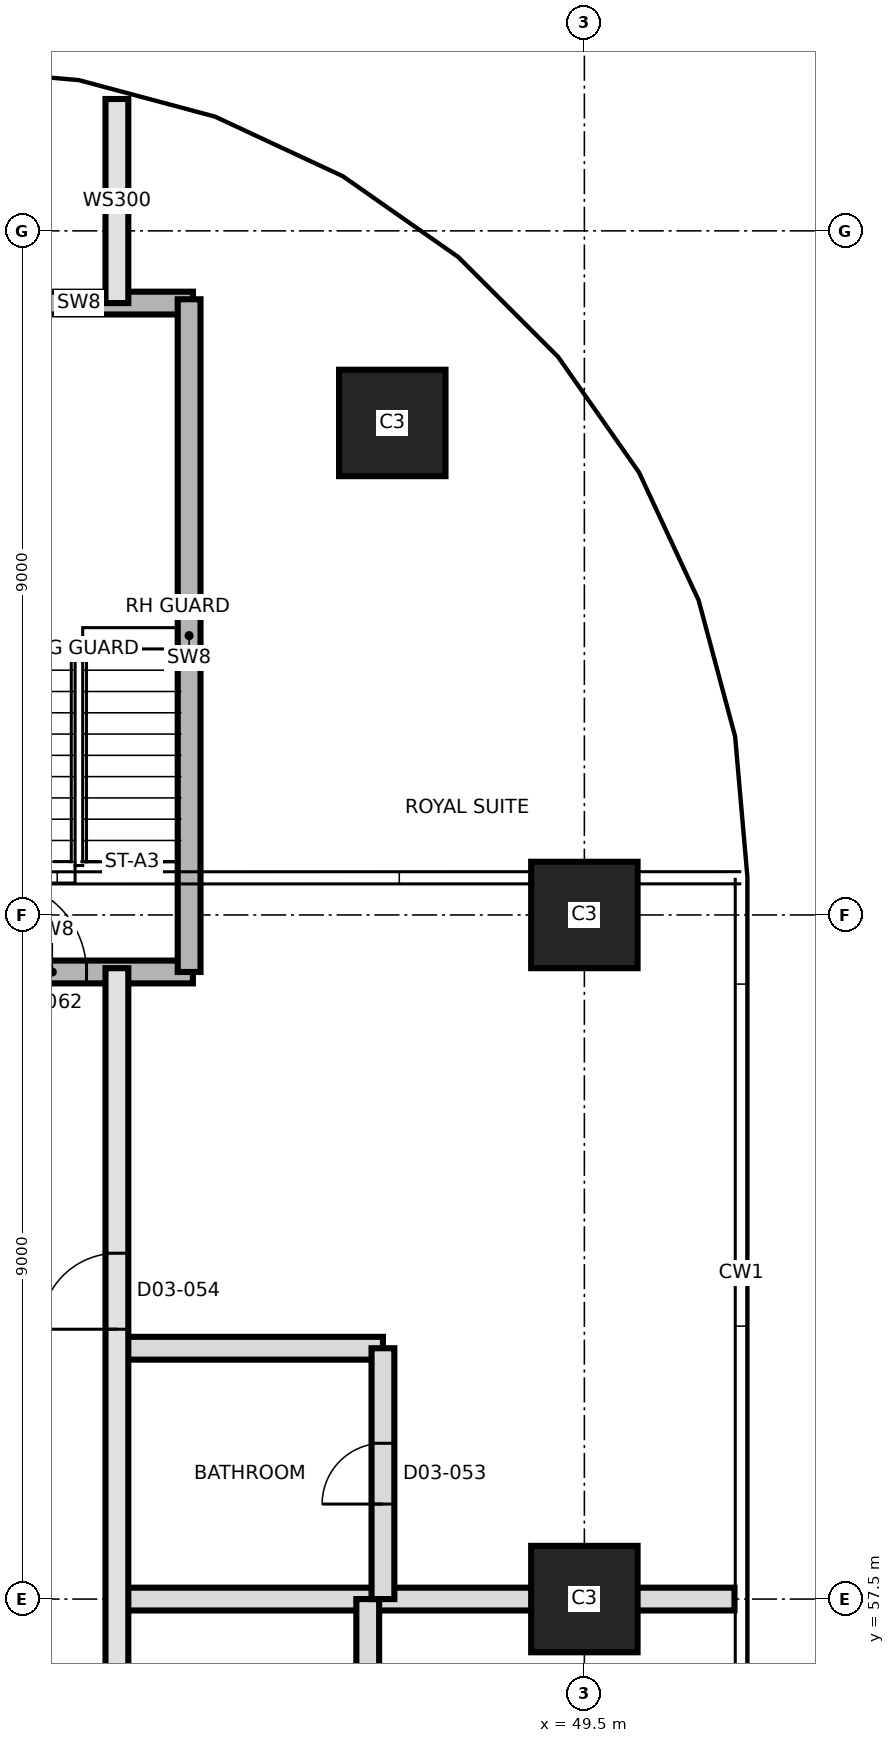
"""IFC4 building model, lengths in metres.
Left out: names, types, materials, properties, quantities, classifications, styles, units other than length and angle.
Written with IfcOpenShell. Run it as: python <this file> out.ifc"""

import sys

from ifc_helpers import new_model, si_unit, direction, frame, frame_2d, origin, origin_2d, place, context, subcontext, project, spatial, rectangle, extrude, element, fill, save


model = new_model("IFC4")
c1 = context("Model", 3, precision=1e-05, world=origin(), true_north=direction((0.0, 1.0)))
c2 = subcontext(c1, "Body", "Model", "MODEL_VIEW")
j1 = project(units=[si_unit("LENGTHUNIT", "METRE"), si_unit("PLANEANGLEUNIT", "RADIAN")], contexts=[c1])
p1 = place(None, origin())
s1 = spatial("IfcSite", under=j1, at=p1, CompositionType="ELEMENT")
p2 = place(p1, origin())
s2 = spatial("IfcBuilding", under=s1, at=p2, CompositionType="ELEMENT")
p3 = place(p2, frame((0.0, 0.0, 55.7)))
s3 = spatial("IfcBuildingStorey", under=s2, at=p3, CompositionType="ELEMENT", Elevation=55.7)
for number, where, z_axis, x_axis in (
    (1, (49.5, 57.5, 0.0), (0.0, 0.0, 1.0), (1.0, 0.0, 0.0)),
    (2, (49.5, 66.5, 0.0), (0.0, 0.0, 1.0), (1.0, 0.0, 0.0)),
    (3, (46.973, 72.973, 0.0), (0.0, 0.0, 1.0), (1.0, 0.0, 0.0)),
):
    element("IfcColumn", number, at=place(p3, frame(where, z_axis=z_axis, x_axis=x_axis)), inside=s3, PredefinedType="COLUMN", context=c2, shape_type="SweptSolid", body=[
        extrude(rectangle(XDim=1.4, YDim=1.4, at=origin_2d()), origin(), (0.0, 0.0, 1.0), 3.7),
    ])
p4 = place(p3, frame((43.35, 57.5, 0.0), z_axis=(0.0, 0.0, 1.0), x_axis=(1.0, 0.0, 0.0)))
e4 = element("IfcWall", 4, at=p4, inside=s3, PredefinedType="PARTITIONING", context=c2, shape_type="SweptSolid", body=[
    extrude(rectangle(XDim=8.125, YDim=0.3, at=frame_2d((4.062, 0.0))), origin(), (0.0, 0.0, 1.0), 3.4),
])
p5 = place(p3, frame((43.35, 60.8, 0.0), z_axis=(0.0, 0.0, 1.0), x_axis=(1.0, 0.0, 0.0)))
e5 = element("IfcWall", 5, at=p5, inside=s3, PredefinedType="PARTITIONING", context=c2, shape_type="SweptSolid", body=[
    extrude(rectangle(XDim=3.5, YDim=0.3, at=frame_2d((1.75, 0.0))), origin(), (0.0, 0.0, 1.0), 3.4),
])
p6 = place(p3, frame((40.65, 65.75, 0.0), z_axis=(0.0, 0.0, 1.0), x_axis=(1.0, 0.0, 0.0)))
e6 = element("IfcWall", 6, at=p6, inside=s3, PredefinedType="SHEAR", context=c2, shape_type="SweptSolid", body=[
    extrude(rectangle(XDim=3.7, YDim=0.3, at=frame_2d((1.85, 0.0))), origin(), (0.0, 0.0, 1.0), 3.4),
])
p7 = place(p6, frame((1.1, 0.0, 0.0)))
e7 = element("IfcOpeningElement", 7, at=p7, cuts=e6, PredefinedType="OPENING", context=c2, shape_type="SweptSolid", body=[
    extrude(rectangle(XDim=1.2, YDim=2.1, at=frame_2d((0.6, 1.05))), frame((0.0, 0.16, 0.0), z_axis=(0.0, -1.0, 0.0), x_axis=(1.0, 0.0, 0.0)), (0.0, 0.0, 1.0), 0.32),
])
p8 = place(p3, frame((41.35, 74.55, 0.0), z_axis=(0.0, 0.0, 1.0), x_axis=(1.0, 0.0, 0.0)))
e8 = element("IfcWall", 8, at=p8, inside=s3, PredefinedType="SHEAR", context=c2, shape_type="SweptSolid", body=[
    extrude(rectangle(XDim=3.0, YDim=0.3, at=frame_2d((1.5, 0.0))), origin(), (0.0, 0.0, 1.0), 3.4),
])
p9 = place(p3, frame((43.35, 39.95, 0.0), z_axis=(0.0, 0.0, 1.0), x_axis=(0.0, 1.0, 0.0)))
e9 = element("IfcWall", 9, at=p9, inside=s3, PredefinedType="SOLIDWALL", context=c2, shape_type="SweptSolid", body=[
    extrude(rectangle(XDim=25.85, YDim=0.3, at=frame_2d((12.925, 0.0))), origin(), (0.0, 0.0, 1.0), 3.4),
])
p10 = place(p9, frame((0.7, 0.0, 0.0)))
e10 = element("IfcOpeningElement", 10, at=p10, cuts=e9, PredefinedType="OPENING", context=c2, shape_type="SweptSolid", body=[
    extrude(rectangle(XDim=1.0, YDim=2.1, at=frame_2d((0.5, 1.05))), frame((0.0, 0.16, 0.0), z_axis=(0.0, -1.0, 0.0), x_axis=(1.0, 0.0, 0.0)), (0.0, 0.0, 1.0), 0.32),
])
p11 = place(p9, frame((6.55, 0.0, 0.0)))
e11 = element("IfcOpeningElement", 11, at=p11, cuts=e9, PredefinedType="OPENING", context=c2, shape_type="SweptSolid", body=[
    extrude(rectangle(XDim=1.0, YDim=2.1, at=frame_2d((0.5, 1.05))), frame((0.0, 0.16, 0.0), z_axis=(0.0, -1.0, 0.0), x_axis=(1.0, 0.0, 0.0)), (0.0, 0.0, 1.0), 0.32),
])
p12 = place(p9, frame((12.55, 0.0, 0.0)))
e12 = element("IfcOpeningElement", 12, at=p12, cuts=e9, PredefinedType="OPENING", context=c2, shape_type="SweptSolid", body=[
    extrude(rectangle(XDim=1.0, YDim=2.4, at=frame_2d((0.5, 1.2))), frame((0.0, 0.16, 0.0), z_axis=(0.0, -1.0, 0.0), x_axis=(1.0, 0.0, 0.0)), (0.0, 0.0, 1.0), 0.32),
])
p13 = place(p9, frame((21.1, 0.0, 0.0)))
e13 = element("IfcOpeningElement", 13, at=p13, cuts=e9, PredefinedType="OPENING", context=c2, shape_type="SweptSolid", body=[
    extrude(rectangle(XDim=1.0, YDim=2.4, at=frame_2d((0.5, 1.2))), frame((0.0, 0.16, 0.0), z_axis=(0.0, -1.0, 0.0), x_axis=(1.0, 0.0, 0.0)), (0.0, 0.0, 1.0), 0.32),
])
p14 = place(p3, frame((43.35, 74.55, 0.0), z_axis=(0.0, 0.0, 1.0), x_axis=(0.0, 1.0, 0.0)))
e14 = element("IfcWall", 14, at=p14, inside=s3, PredefinedType="SOLIDWALL", context=c2, shape_type="SweptSolid", body=[
    extrude(rectangle(XDim=2.685, YDim=0.3, at=frame_2d((1.343, 0.0))), origin(), (0.0, 0.0, 1.0), 3.4),
])
p15 = place(p3, frame((44.3, 65.75, 0.0), z_axis=(0.0, 0.0, 1.0), x_axis=(0.0, 1.0, 0.0)))
e15 = element("IfcWall", 15, at=p15, inside=s3, PredefinedType="SHEAR", context=c2, shape_type="SweptSolid", body=[
    extrude(rectangle(XDim=8.85, YDim=0.3, at=frame_2d((4.425, 0.0))), origin(), (0.0, 0.0, 1.0), 3.4),
])
p16 = place(p3, frame((46.65, 54.5, 0.0), z_axis=(0.0, 0.0, 1.0), x_axis=(0.0, 1.0, 0.0)))
e16 = element("IfcWall", 16, at=p16, inside=s3, PredefinedType="PARTITIONING", context=c2, shape_type="SweptSolid", body=[
    extrude(rectangle(XDim=3.0, YDim=0.3, at=frame_2d((1.5, 0.0))), origin(), (0.0, 0.0, 1.0), 3.4),
])
p17 = place(p16, frame((1.1, 0.0, 0.0)))
e17 = element("IfcOpeningElement", 17, at=p17, cuts=e16, PredefinedType="OPENING", context=c2, shape_type="SweptSolid", body=[
    extrude(rectangle(XDim=0.8, YDim=2.1, at=frame_2d((0.4, 1.05))), frame((0.0, 0.16, 0.0), z_axis=(0.0, -1.0, 0.0), x_axis=(1.0, 0.0, 0.0)), (0.0, 0.0, 1.0), 0.32),
])
p18 = place(p3, frame((46.85, 57.5, 0.0), z_axis=(0.0, 0.0, 1.0), x_axis=(0.0, 1.0, 0.0)))
e18 = element("IfcWall", 18, at=p18, inside=s3, PredefinedType="PARTITIONING", context=c2, shape_type="SweptSolid", body=[
    extrude(rectangle(XDim=3.3, YDim=0.3, at=frame_2d((1.65, 0.0))), origin(), (0.0, 0.0, 1.0), 3.4),
])
p19 = place(p18, frame((1.25, 0.0, 0.0)))
e19 = element("IfcOpeningElement", 19, at=p19, cuts=e18, PredefinedType="OPENING", context=c2, shape_type="SweptSolid", body=[
    extrude(rectangle(XDim=0.8, YDim=2.1, at=frame_2d((0.4, 1.05))), frame((0.0, 0.16, 0.0), z_axis=(0.0, -1.0, 0.0), x_axis=(1.0, 0.0, 0.0)), (0.0, 0.0, 1.0), 0.32),
])
p20 = place(p19, origin())
e20 = element("IfcDoor", 20, at=p20, inside=s3, OperationType="SINGLE_SWING_LEFT", PredefinedType="DOOR", context=c2, shape_type="SweptSolid", body=[
    extrude(rectangle(XDim=0.8, YDim=2.1, at=frame_2d((0.4, 1.05))), frame((0.0, 0.025, 0.0), z_axis=(0.0, -1.0, 0.0), x_axis=(1.0, 0.0, 0.0)), (0.0, 0.0, 1.0), 0.05),
])
fill(e19, e20)
p21 = place(p13, origin())
e21 = element("IfcDoor", 21, at=p21, inside=s3, OperationType="SINGLE_SWING_LEFT", PredefinedType="DOOR", context=c2, shape_type="SweptSolid", body=[
    extrude(rectangle(XDim=1.0, YDim=2.4, at=frame_2d((0.5, 1.2))), frame((0.0, 0.025, 0.0), z_axis=(0.0, -1.0, 0.0), x_axis=(1.0, 0.0, 0.0)), (0.0, 0.0, 1.0), 0.05),
])
fill(e13, e21)
p22 = place(p7, origin())
e22 = element("IfcDoor", 22, at=p22, inside=s3, OperationType="SINGLE_SWING_RIGHT", PredefinedType="DOOR", context=c2, shape_type="SweptSolid", body=[
    extrude(rectangle(XDim=1.2, YDim=2.1, at=frame_2d((0.6, 1.05))), frame((0.0, 0.025, 0.0), z_axis=(0.0, -1.0, 0.0), x_axis=(1.0, 0.0, 0.0)), (0.0, 0.0, 1.0), 0.05),
])
fill(e7, e22)
save(model, sys.argv[1])
